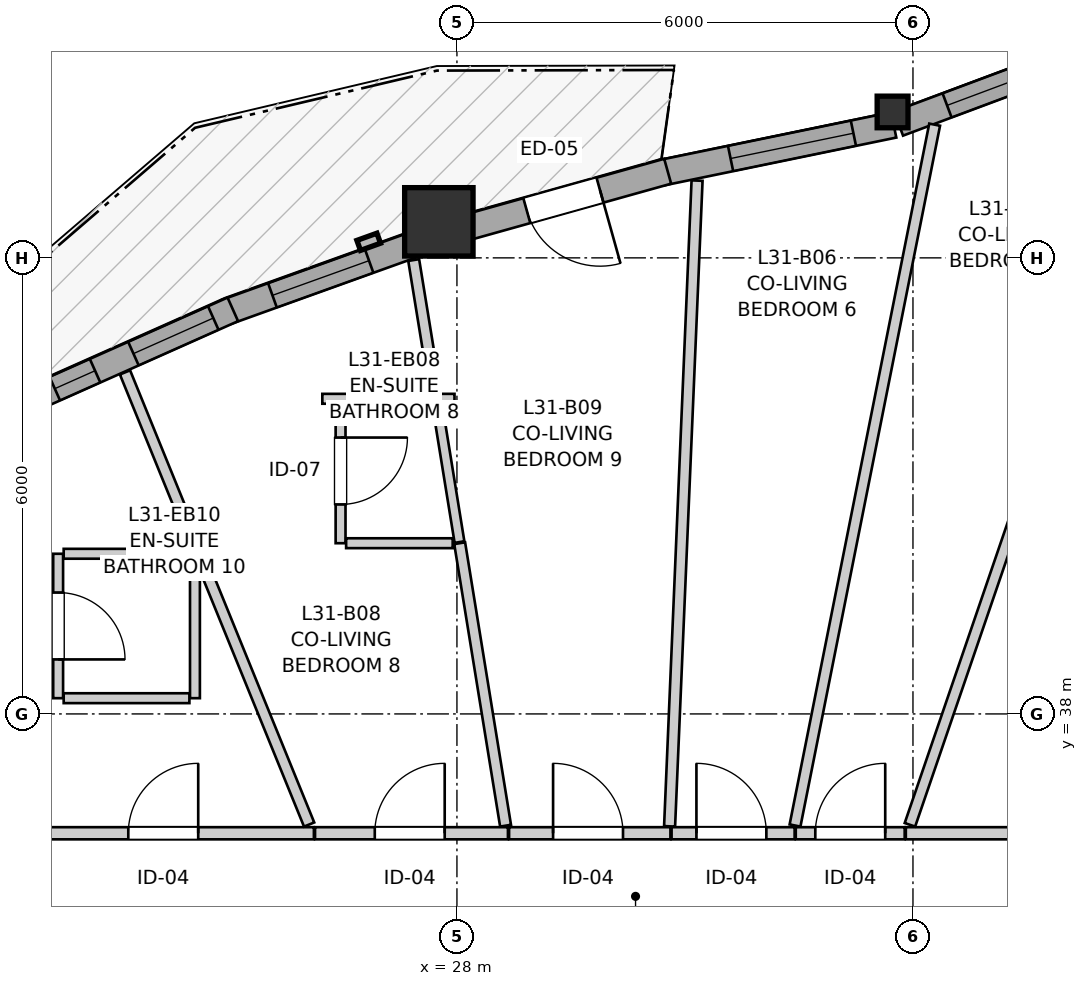
"""IFC4 building model, lengths in metres.
Left out: names, types, materials, properties, quantities, classifications, styles, units other than length and angle.
Written with IfcOpenShell. Run it as: python <this file> out.ifc"""

import sys

from ifc_helpers import new_model, si_unit, direction, frame, frame_2d, origin, origin_2d, place, context, subcontext, project, spatial, rectangle, i_section, extrude, source, transform, mapped, element, fill, save


model = new_model("IFC4")
c1 = context("Model", 3, precision=1e-05, world=origin(), true_north=direction((0.0, 1.0)))
c2 = subcontext(c1, "Body", "Model", "MODEL_VIEW")
j1 = project(units=[si_unit("LENGTHUNIT", "METRE"), si_unit("PLANEANGLEUNIT", "RADIAN")], contexts=[c1])
p1 = place(None, origin())
s1 = spatial("IfcSite", under=j1, at=p1, CompositionType="ELEMENT")
p2 = place(p1, origin())
s2 = spatial("IfcBuilding", under=s1, at=p2, CompositionType="ELEMENT")
p3 = place(p2, frame((0.0, 0.0, 105.6)))
s3 = spatial("IfcBuildingStorey", under=s2, at=p3, CompositionType="ELEMENT", Elevation=105.6)
m1 = source(origin(), c2, "Body", "SweptSolid", [
    extrude(i_section(OverallWidth=0.406, OverallDepth=0.416, WebThickness=0.027, FlangeThickness=0.044, FilletRadius=0.015, at=origin_2d()), origin(), (0.0, 0.0, 1.0), 2.935),
])
p4 = place(p3, frame((33.732, 45.92, 0.0), z_axis=(0.0, 0.0, 1.0), x_axis=(1.0, 0.0, 0.0)))
e1 = element("IfcColumn", 1, at=p4, inside=s3, PredefinedType="PILASTER", context=c2, shape_type="MappedRepresentation", body=[
    mapped(m1, transform((0.0, 0.0, 0.0), x_axis=(1.0, 0.0, 0.0), y_axis=(0.0, 1.0, 0.0), z_axis=(0.0, 0.0, 1.0), scale=1.0)),
])
m2 = source(origin(), c2, "Body", "SweptSolid", [
    extrude(rectangle(XDim=0.9, YDim=0.9, at=origin_2d()), origin(), (0.0, 0.0, 1.0), 2.935),
])
p5 = place(p3, frame((27.762, 44.474, 0.0), z_axis=(0.0, 0.0, 1.0), x_axis=(1.0, 0.0, 0.0)))
e2 = element("IfcColumn", 2, at=p5, inside=s3, PredefinedType="COLUMN", context=c2, shape_type="MappedRepresentation", body=[
    mapped(m2, transform((0.0, 0.0, 0.0), x_axis=(1.0, 0.0, 0.0), y_axis=(0.0, 1.0, 0.0), z_axis=(0.0, 0.0, 1.0), scale=1.0)),
])
p6 = place(p3, frame((35.722, 46.481, 0.0), z_axis=(0.0, 0.0, 1.0), x_axis=(-0.9368002254, -0.349864741994, 0.0)))
e3 = element("IfcWall", 3, at=p6, inside=s3, PredefinedType="SOLIDWALL", context=c2, shape_type="SweptSolid", body=[
    extrude(rectangle(XDim=2.041, YDim=0.34, at=frame_2d((1.021, 0.0))), origin(), (0.0, 0.0, 1.0), 2.465),
])
p7 = place(p6, frame((0.309, 0.0, 0.82)))
e4 = element("IfcOpeningElement", 4, at=p7, cuts=e3, PredefinedType="OPENING", context=c2, shape_type="SweptSolid", body=[
    extrude(rectangle(XDim=1.05, YDim=1.45, at=frame_2d((0.525, 0.725))), frame((0.0, 0.18, 0.0), z_axis=(0.0, -1.0, 0.0), x_axis=(1.0, 0.0, 0.0)), (0.0, 0.0, 1.0), 0.36),
])
p8 = place(p3, frame((33.747, 45.749, 0.0), z_axis=(0.0, 0.0, 1.0), x_axis=(-0.979440240026, -0.201734519153, 0.0)))
e5 = element("IfcWall", 5, at=p8, inside=s3, PredefinedType="SOLIDWALL", context=c2, shape_type="SweptSolid", body=[
    extrude(rectangle(XDim=3.124, YDim=0.34, at=frame_2d((1.562, 0.0))), origin(), (0.0, 0.0, 1.0), 2.465),
])
p9 = place(p8, frame((0.541, 0.0, 0.82)))
e6 = element("IfcOpeningElement", 6, at=p9, cuts=e5, PredefinedType="OPENING", context=c2, shape_type="SweptSolid", body=[
    extrude(rectangle(XDim=1.65, YDim=1.45, at=frame_2d((0.825, 0.725))), frame((0.0, 0.18, 0.0), z_axis=(0.0, -1.0, 0.0), x_axis=(1.0, 0.0, 0.0)), (0.0, 0.0, 1.0), 0.36),
])
p10 = place(p3, frame((30.773, 45.139, 0.0), z_axis=(0.0, 0.0, 1.0), x_axis=(-0.963038749839, -0.269362889627, 0.0)))
e7 = element("IfcWall", 7, at=p10, inside=s3, PredefinedType="SOLIDWALL", context=c2, shape_type="SweptSolid", body=[
    extrude(rectangle(XDim=2.849, YDim=0.34, at=frame_2d((1.424, 0.0))), origin(), (0.0, 0.0, 1.0), 2.465),
])
p11 = place(p10, frame((0.924, 0.0, 0.0)))
e8 = element("IfcOpeningElement", 8, at=p11, cuts=e7, PredefinedType="OPENING", context=c2, shape_type="SweptSolid", body=[
    extrude(rectangle(XDim=1.0, YDim=2.1, at=frame_2d((0.5, 1.05))), frame((0.0, 0.18, 0.0), z_axis=(0.0, -1.0, 0.0), x_axis=(1.0, 0.0, 0.0)), (0.0, 0.0, 1.0), 0.36),
])
p12 = place(p3, frame((27.603, 44.236, 0.0), z_axis=(0.0, 0.0, 1.0), x_axis=(-0.941110715193, -0.33809853852, 0.0)))
e9 = element("IfcWall", 9, at=p12, inside=s3, PredefinedType="SOLIDWALL", context=c2, shape_type="SweptSolid", body=[
    extrude(rectangle(XDim=2.799, YDim=0.34, at=frame_2d((1.399, 0.0))), origin(), (0.0, 0.0, 1.0), 2.465),
])
p13 = place(p12, frame((0.807, 0.0, 0.82)))
e10 = element("IfcOpeningElement", 10, at=p13, cuts=e9, PredefinedType="OPENING", context=c2, shape_type="SweptSolid", body=[
    extrude(rectangle(XDim=1.35, YDim=1.45, at=frame_2d((0.675, 0.725))), frame((0.0, 0.18, 0.0), z_axis=(0.0, -1.0, 0.0), x_axis=(1.0, 0.0, 0.0)), (0.0, 0.0, 1.0), 0.36),
])
p14 = place(p3, frame((25.051, 43.323, 0.0), z_axis=(0.0, 0.0, 1.0), x_axis=(-0.913432176814, -0.406990980686, 0.0)))
e11 = element("IfcWall", 11, at=p14, inside=s3, PredefinedType="SOLIDWALL", context=c2, shape_type="SweptSolid", body=[
    extrude(rectangle(XDim=2.975, YDim=0.34, at=frame_2d((1.488, 0.0))), origin(), (0.0, 0.0, 1.0), 2.465),
])
p15 = place(p14, frame((0.281, 0.0, 0.82)))
e12 = element("IfcOpeningElement", 12, at=p15, cuts=e11, PredefinedType="OPENING", context=c2, shape_type="SweptSolid", body=[
    extrude(rectangle(XDim=1.15, YDim=1.2, at=frame_2d((0.575, 0.6))), frame((0.0, 0.18, 0.0), z_axis=(0.0, -1.0, 0.0), x_axis=(1.0, 0.0, 0.0)), (0.0, 0.0, 1.0), 0.36),
])
p16 = place(p14, frame((1.984, 0.0, 0.82)))
e13 = element("IfcOpeningElement", 13, at=p16, cuts=e11, PredefinedType="OPENING", context=c2, shape_type="SweptSolid", body=[
    extrude(rectangle(XDim=0.58, YDim=1.35, at=frame_2d((0.29, 0.675))), frame((0.0, 0.18, 0.0), z_axis=(0.0, -1.0, 0.0), x_axis=(1.0, 0.0, 0.0)), (0.0, 0.0, 1.0), 0.36),
])
p17 = place(p3, frame((33.906, 36.43, 0.0), z_axis=(0.0, 0.0, 1.0), x_axis=(1.0, 0.0, 0.0)))
e14 = element("IfcWall", 14, at=p17, inside=s3, PredefinedType="PARTITIONING", context=c2, shape_type="SweptSolid", body=[
    extrude(rectangle(XDim=4.624, YDim=0.16, at=frame_2d((2.312, 0.0))), origin(), (0.0, 0.0, 1.0), 2.573),
])
p18 = place(p17, frame((1.84, 0.0, 0.0)))
e15 = element("IfcOpeningElement", 15, at=p18, cuts=e14, PredefinedType="OPENING", context=c2, shape_type="SweptSolid", body=[
    extrude(rectangle(XDim=0.96, YDim=2.1, at=frame_2d((0.48, 1.05))), frame((0.0, 0.09, 0.0), z_axis=(0.0, -1.0, 0.0), x_axis=(1.0, 0.0, 0.0)), (0.0, 0.0, 1.0), 0.18),
])
p19 = place(p3, frame((22.17, 36.43, 0.0), z_axis=(0.0, 0.0, 1.0), x_axis=(1.0, 0.0, 0.0)))
e16 = element("IfcWall", 16, at=p19, inside=s3, PredefinedType="PARTITIONING", context=c2, shape_type="SweptSolid", body=[
    extrude(rectangle(XDim=3.948, YDim=0.16, at=frame_2d((1.974, 0.0))), origin(), (0.0, 0.0, 1.0), 2.573),
])
p20 = place(p19, frame((1.506, 0.0, 0.0)))
e17 = element("IfcOpeningElement", 17, at=p20, cuts=e16, PredefinedType="OPENING", context=c2, shape_type="SweptSolid", body=[
    extrude(rectangle(XDim=0.92, YDim=2.1, at=frame_2d((0.46, 1.05))), frame((0.0, 0.09, 0.0), z_axis=(0.0, -1.0, 0.0), x_axis=(1.0, 0.0, 0.0)), (0.0, 0.0, 1.0), 0.18),
])
p21 = place(p3, frame((26.133, 36.43, 0.0), z_axis=(0.0, 0.0, 1.0), x_axis=(1.0, 0.0, 0.0)))
e18 = element("IfcWall", 18, at=p21, inside=s3, PredefinedType="PARTITIONING", context=c2, shape_type="SweptSolid", body=[
    extrude(rectangle(XDim=2.538, YDim=0.16, at=frame_2d((1.269, 0.0))), origin(), (0.0, 0.0, 1.0), 2.935),
])
p22 = place(p21, frame((0.786, 0.0, 0.0)))
e19 = element("IfcOpeningElement", 19, at=p22, cuts=e18, PredefinedType="OPENING", context=c2, shape_type="SweptSolid", body=[
    extrude(rectangle(XDim=0.92, YDim=2.1, at=frame_2d((0.46, 1.05))), frame((0.0, 0.09, 0.0), z_axis=(0.0, -1.0, 0.0), x_axis=(1.0, 0.0, 0.0)), (0.0, 0.0, 1.0), 0.18),
])
p23 = place(p3, frame((28.686, 36.43, 0.0), z_axis=(0.0, 0.0, 1.0), x_axis=(1.0, 0.0, 0.0)))
e20 = element("IfcWall", 20, at=p23, inside=s3, PredefinedType="PARTITIONING", context=c2, shape_type="SweptSolid", body=[
    extrude(rectangle(XDim=2.123, YDim=0.16, at=frame_2d((1.062, 0.0))), origin(), (0.0, 0.0, 1.0), 2.935),
])
p24 = place(p23, frame((0.579, 0.0, 0.0)))
e21 = element("IfcOpeningElement", 21, at=p24, cuts=e20, PredefinedType="OPENING", context=c2, shape_type="SweptSolid", body=[
    extrude(rectangle(XDim=0.92, YDim=2.1, at=frame_2d((0.46, 1.05))), frame((0.0, 0.09, 0.0), z_axis=(0.0, -1.0, 0.0), x_axis=(1.0, 0.0, 0.0)), (0.0, 0.0, 1.0), 0.18),
])
p25 = place(p3, frame((26.469, 42.073, 0.0), z_axis=(0.0, 0.0, 1.0), x_axis=(0.0, -1.0, 0.0)))
e22 = element("IfcWall", 22, at=p25, inside=s3, PredefinedType="PARTITIONING", context=c2, shape_type="SweptSolid", body=[
    extrude(rectangle(XDim=1.827, YDim=0.13, at=frame_2d((0.914, 0.0))), origin(), (0.0, 0.0, 1.0), 2.935),
])
p26 = place(p25, frame((0.437, 0.0, 0.0)))
e23 = element("IfcOpeningElement", 23, at=p26, cuts=e22, PredefinedType="OPENING", context=c2, shape_type="SweptSolid", body=[
    extrude(rectangle(XDim=0.88, YDim=2.05, at=frame_2d((0.44, 1.025))), frame((0.0, 0.075, 0.0), z_axis=(0.0, -1.0, 0.0), x_axis=(1.0, 0.0, 0.0)), (0.0, 0.0, 1.0), 0.15),
])
p27 = place(p3, frame((22.753, 40.107, 0.0), z_axis=(0.0, 0.0, 1.0), x_axis=(0.0, -1.0, 0.0)))
e24 = element("IfcWall", 24, at=p27, inside=s3, PredefinedType="PARTITIONING", context=c2, shape_type="SweptSolid", body=[
    extrude(rectangle(XDim=1.9, YDim=0.13, at=frame_2d((0.95, 0.0))), origin(), (0.0, 0.0, 1.0), 2.935),
])
p28 = place(p27, frame((0.51, 0.0, 0.0)))
e25 = element("IfcOpeningElement", 25, at=p28, cuts=e24, PredefinedType="OPENING", context=c2, shape_type="SweptSolid", body=[
    extrude(rectangle(XDim=0.88, YDim=2.05, at=frame_2d((0.44, 1.025))), frame((0.0, 0.075, 0.0), z_axis=(0.0, -1.0, 0.0), x_axis=(1.0, 0.0, 0.0)), (0.0, 0.0, 1.0), 0.15),
])
p29 = place(p3, frame((30.824, 36.43, 0.0), z_axis=(0.0, 0.0, 1.0), x_axis=(1.0, 0.0, 0.0)))
e26 = element("IfcWall", 26, at=p29, inside=s3, PredefinedType="PARTITIONING", context=c2, shape_type="SweptSolid", body=[
    extrude(rectangle(XDim=1.619, YDim=0.16, at=frame_2d((0.81, 0.0))), origin(), (0.0, 0.0, 1.0), 2.935),
])
p30 = place(p29, frame((0.327, 0.0, 0.0)))
e27 = element("IfcOpeningElement", 27, at=p30, cuts=e26, PredefinedType="OPENING", context=c2, shape_type="SweptSolid", body=[
    extrude(rectangle(XDim=0.92, YDim=2.1, at=frame_2d((0.46, 1.05))), frame((0.0, 0.09, 0.0), z_axis=(0.0, -1.0, 0.0), x_axis=(1.0, 0.0, 0.0)), (0.0, 0.0, 1.0), 0.18),
])
p31 = place(p3, frame((32.458, 36.43, 0.0), z_axis=(0.0, 0.0, 1.0), x_axis=(1.0, 0.0, 0.0)))
e28 = element("IfcWall", 28, at=p31, inside=s3, PredefinedType="PARTITIONING", context=c2, shape_type="SweptSolid", body=[
    extrude(rectangle(XDim=1.433, YDim=0.16, at=frame_2d((0.717, 0.0))), origin(), (0.0, 0.0, 1.0), 2.935),
])
p32 = place(p31, frame((0.257, 0.0, 0.0)))
e29 = element("IfcOpeningElement", 29, at=p32, cuts=e28, PredefinedType="OPENING", context=c2, shape_type="SweptSolid", body=[
    extrude(rectangle(XDim=0.92, YDim=2.1, at=frame_2d((0.46, 1.05))), frame((0.0, 0.09, 0.0), z_axis=(0.0, -1.0, 0.0), x_axis=(1.0, 0.0, 0.0)), (0.0, 0.0, 1.0), 0.18),
])
p33 = place(p3, frame((33.96, 36.541, 0.0), z_axis=(0.0, 0.0, 1.0), x_axis=(0.324058346196, 0.946037096662, 0.0)))
e30 = element("IfcWall", 30, at=p33, inside=s3, PredefinedType="PARTITIONING", context=c2, shape_type="SweptSolid", body=[
    extrude(rectangle(XDim=10.302, YDim=0.145, at=frame_2d((5.151, 0.0))), origin(), (0.0, 0.0, 1.0), 2.935),
])
p34 = place(p3, frame((32.448, 36.532, 0.0), z_axis=(0.0, 0.0, 1.0), x_axis=(0.195406965811, 0.980722242897, 0.0)))
e31 = element("IfcWall", 31, at=p34, inside=s3, PredefinedType="PARTITIONING", context=c2, shape_type="SweptSolid", body=[
    extrude(rectangle(XDim=9.402, YDim=0.145, at=frame_2d((4.701, 0.0))), origin(), (0.0, 0.0, 1.0), 2.935),
])
p35 = place(p3, frame((30.798, 36.521, 0.0), z_axis=(0.0, 0.0, 1.0), x_axis=(0.042521424142, 0.999095555234, 0.0)))
e32 = element("IfcWall", 32, at=p35, inside=s3, PredefinedType="PARTITIONING", context=c2, shape_type="SweptSolid", body=[
    extrude(rectangle(XDim=8.503, YDim=0.145, at=frame_2d((4.252, 0.0))), origin(), (0.0, 0.0, 1.0), 2.935),
])
p36 = place(p3, frame((23.633, 42.493, 0.0), z_axis=(0.0, 0.0, 1.0), x_axis=(0.37719666663, -0.926133184096, 0.0)))
e33 = element("IfcWall", 33, at=p36, inside=s3, PredefinedType="PARTITIONING", context=c2, shape_type="SweptSolid", body=[
    extrude(rectangle(XDim=6.423, YDim=0.145, at=frame_2d((3.211, 0.0))), origin(), (0.0, 0.0, 1.0), 2.935),
])
p37 = place(p3, frame((28.036, 40.246, 0.0), z_axis=(0.0, 0.0, 1.0), x_axis=(0.160412651813, -0.987050039835, 0.0)))
e34 = element("IfcWall", 34, at=p37, inside=s3, PredefinedType="PARTITIONING", context=c2, shape_type="SweptSolid", body=[
    extrude(rectangle(XDim=3.765, YDim=0.145, at=frame_2d((1.883, 0.0))), origin(), (0.0, 0.0, 1.0), 2.353),
])
p38 = place(p3, frame((27.741, 42.063, 0.0), z_axis=(0.0, 0.0, 1.0), x_axis=(0.160081724147, -0.98710376435, 0.0)))
e35 = element("IfcWall", 35, at=p38, inside=s3, PredefinedType="PARTITIONING", context=c2, shape_type="SweptSolid", body=[
    extrude(rectangle(XDim=1.825, YDim=0.13, at=frame_2d((0.913, 0.0))), origin(), (0.0, 0.0, 1.0), 2.353),
])
p39 = place(p3, frame((24.553, 38.207, 0.0), z_axis=(0.0, 0.0, 1.0), x_axis=(0.0, 1.0, 0.0)))
e36 = element("IfcWall", 36, at=p39, inside=s3, PredefinedType="PARTITIONING", context=c2, shape_type="SweptSolid", body=[
    extrude(rectangle(XDim=1.66, YDim=0.13, at=frame_2d((0.83, 0.0))), origin(), (0.0, 0.0, 1.0), 2.935),
])
p40 = place(p3, frame((27.431, 43.971, 0.0), z_axis=(0.0, 0.0, 1.0), x_axis=(0.160707234414, -0.987002119961, 0.0)))
e37 = element("IfcWall", 37, at=p40, inside=s3, PredefinedType="PARTITIONING", context=c2, shape_type="SweptSolid", body=[
    extrude(rectangle(XDim=1.749, YDim=0.145, at=frame_2d((0.874, 0.0))), origin(), (0.0, 0.0, 1.0), 2.935),
])
p41 = place(p3, frame((22.826, 40.107, 0.0), z_axis=(0.0, 0.0, 1.0), x_axis=(1.0, 0.0, 0.0)))
e38 = element("IfcWall", 38, at=p41, inside=s3, PredefinedType="PARTITIONING", context=c2, shape_type="SweptSolid", body=[
    extrude(rectangle(XDim=1.614, YDim=0.13, at=frame_2d((0.807, 0.0))), origin(), (0.0, 0.0, 1.0), 2.935),
])
p42 = place(p3, frame((22.826, 38.207, 0.0), z_axis=(0.0, 0.0, 1.0), x_axis=(1.0, 0.0, 0.0)))
e39 = element("IfcWall", 39, at=p42, inside=s3, PredefinedType="PARTITIONING", context=c2, shape_type="SweptSolid", body=[
    extrude(rectangle(XDim=1.654, YDim=0.13, at=frame_2d((0.827, 0.0))), origin(), (0.0, 0.0, 1.0), 2.935),
])
p43 = place(p3, frame((26.542, 40.246, 0.0), z_axis=(0.0, 0.0, 1.0), x_axis=(1.0, 0.0, 0.0)))
e40 = element("IfcWall", 40, at=p43, inside=s3, PredefinedType="PARTITIONING", context=c2, shape_type="SweptSolid", body=[
    extrude(rectangle(XDim=1.402, YDim=0.13, at=frame_2d((0.701, 0.0))), origin(), (0.0, 0.0, 1.0), 2.935),
])
p44 = place(p3, frame((26.229, 42.146, 0.0), z_axis=(0.0, 0.0, 1.0), x_axis=(1.0, 0.0, 0.0)))
e41 = element("IfcWall", 41, at=p44, inside=s3, PredefinedType="PARTITIONING", context=c2, shape_type="SweptSolid", body=[
    extrude(rectangle(XDim=1.739, YDim=0.13, at=frame_2d((0.87, 0.0))), origin(), (0.0, 0.0, 1.0), 2.935),
])
m3 = source(origin(), c2, "Body", "SweptSolid", [
    extrude(rectangle(XDim=1.05, YDim=1.45, at=frame_2d((0.525, 0.725))), frame((0.0, 0.03, 0.0), z_axis=(0.0, -1.0, 0.0), x_axis=(1.0, 0.0, 0.0)), (0.0, 0.0, 1.0), 0.06),
])
p45 = place(p7, origin())
e42 = element("IfcWindow", 42, at=p45, inside=s3, PartitioningType="SINGLE_PANEL", PredefinedType="WINDOW", context=c2, shape_type="MappedRepresentation", body=[
    mapped(m3, transform((0.0, 0.0, 0.0), x_axis=(1.0, 0.0, 0.0), y_axis=(0.0, 1.0, 0.0), z_axis=(0.0, 0.0, 1.0), scale=1.0)),
])
fill(e4, e42)
m4 = source(origin(), c2, "Body", "SweptSolid", [
    extrude(rectangle(XDim=1.65, YDim=1.45, at=frame_2d((0.825, 0.725))), frame((0.0, 0.03, 0.0), z_axis=(0.0, -1.0, 0.0), x_axis=(1.0, 0.0, 0.0)), (0.0, 0.0, 1.0), 0.06),
])
p46 = place(p9, origin())
e43 = element("IfcWindow", 43, at=p46, inside=s3, PartitioningType="SINGLE_PANEL", PredefinedType="WINDOW", context=c2, shape_type="MappedRepresentation", body=[
    mapped(m4, transform((0.0, 0.0, 0.0), x_axis=(1.0, 0.0, 0.0), y_axis=(0.0, 1.0, 0.0), z_axis=(0.0, 0.0, 1.0), scale=1.0)),
])
fill(e6, e43)
m5 = source(origin(), c2, "Body", "SweptSolid", [
    extrude(rectangle(XDim=1.35, YDim=1.45, at=frame_2d((0.675, 0.725))), frame((0.0, 0.03, 0.0), z_axis=(0.0, -1.0, 0.0), x_axis=(1.0, 0.0, 0.0)), (0.0, 0.0, 1.0), 0.06),
])
p47 = place(p13, origin())
e44 = element("IfcWindow", 44, at=p47, inside=s3, PartitioningType="SINGLE_PANEL", PredefinedType="WINDOW", context=c2, shape_type="MappedRepresentation", body=[
    mapped(m5, transform((0.0, 0.0, 0.0), x_axis=(1.0, 0.0, 0.0), y_axis=(0.0, 1.0, 0.0), z_axis=(0.0, 0.0, 1.0), scale=1.0)),
])
fill(e10, e44)
m6 = source(origin(), c2, "Body", "SweptSolid", [
    extrude(rectangle(XDim=1.15, YDim=1.2, at=frame_2d((0.575, 0.6))), frame((0.0, 0.03, 0.0), z_axis=(0.0, -1.0, 0.0), x_axis=(1.0, 0.0, 0.0)), (0.0, 0.0, 1.0), 0.06),
])
p48 = place(p15, origin())
e45 = element("IfcWindow", 45, at=p48, inside=s3, PartitioningType="SINGLE_PANEL", PredefinedType="WINDOW", context=c2, shape_type="MappedRepresentation", body=[
    mapped(m6, transform((0.0, 0.0, 0.0), x_axis=(1.0, 0.0, 0.0), y_axis=(0.0, 1.0, 0.0), z_axis=(0.0, 0.0, 1.0), scale=1.0)),
])
fill(e12, e45)
m7 = source(origin(), c2, "Body", "SweptSolid", [
    extrude(rectangle(XDim=0.58, YDim=1.35, at=frame_2d((0.29, 0.675))), frame((0.0, 0.03, 0.0), z_axis=(0.0, -1.0, 0.0), x_axis=(1.0, 0.0, 0.0)), (0.0, 0.0, 1.0), 0.06),
])
p49 = place(p16, origin())
e46 = element("IfcWindow", 46, at=p49, inside=s3, PartitioningType="SINGLE_PANEL", PredefinedType="WINDOW", context=c2, shape_type="MappedRepresentation", body=[
    mapped(m7, transform((0.0, 0.0, 0.0), x_axis=(1.0, 0.0, 0.0), y_axis=(0.0, 1.0, 0.0), z_axis=(0.0, 0.0, 1.0), scale=1.0)),
])
fill(e13, e46)
m8 = source(origin(), c2, "Body", "SweptSolid", [
    extrude(rectangle(XDim=1.0, YDim=2.1, at=frame_2d((0.5, 1.05))), frame((0.0, 0.025, 0.0), z_axis=(0.0, -1.0, 0.0), x_axis=(1.0, 0.0, 0.0)), (0.0, 0.0, 1.0), 0.05),
])
p50 = place(p11, origin())
e47 = element("IfcDoor", 47, at=p50, inside=s3, OperationType="SINGLE_SWING_LEFT", PredefinedType="DOOR", context=c2, shape_type="MappedRepresentation", body=[
    mapped(m8, transform((0.0, 0.0, 0.0), x_axis=(1.0, 0.0, 0.0), y_axis=(0.0, 1.0, 0.0), z_axis=(0.0, 0.0, 1.0), scale=1.0)),
])
fill(e8, e47)
m9 = source(origin(), c2, "Body", "SweptSolid", [
    extrude(rectangle(XDim=0.92, YDim=2.1, at=frame_2d((0.46, 1.05))), frame((0.0, 0.025, 0.0), z_axis=(0.0, -1.0, 0.0), x_axis=(1.0, 0.0, 0.0)), (0.0, 0.0, 1.0), 0.05),
])
p51 = place(p20, origin())
e48 = element("IfcDoor", 48, at=p51, inside=s3, OperationType="SINGLE_SWING_RIGHT", PredefinedType="DOOR", context=c2, shape_type="MappedRepresentation", body=[
    mapped(m9, transform((0.0, 0.0, 0.0), x_axis=(1.0, 0.0, 0.0), y_axis=(0.0, 1.0, 0.0), z_axis=(0.0, 0.0, 1.0), scale=1.0)),
])
fill(e17, e48)
p52 = place(p22, origin())
e49 = element("IfcDoor", 49, at=p52, inside=s3, OperationType="SINGLE_SWING_RIGHT", PredefinedType="DOOR", context=c2, shape_type="MappedRepresentation", body=[
    mapped(m9, transform((0.0, 0.0, 0.0), x_axis=(1.0, 0.0, 0.0), y_axis=(0.0, 1.0, 0.0), z_axis=(0.0, 0.0, 1.0), scale=1.0)),
])
fill(e19, e49)
p53 = place(p24, origin())
e50 = element("IfcDoor", 50, at=p53, inside=s3, OperationType="SINGLE_SWING_LEFT", PredefinedType="DOOR", context=c2, shape_type="MappedRepresentation", body=[
    mapped(m9, transform((0.0, 0.0, 0.0), x_axis=(1.0, 0.0, 0.0), y_axis=(0.0, 1.0, 0.0), z_axis=(0.0, 0.0, 1.0), scale=1.0)),
])
fill(e21, e50)
m10 = source(origin(), c2, "Body", "SweptSolid", [
    extrude(rectangle(XDim=0.88, YDim=2.05, at=frame_2d((0.44, 1.025))), frame((0.0, 0.025, 0.0), z_axis=(0.0, -1.0, 0.0), x_axis=(1.0, 0.0, 0.0)), (0.0, 0.0, 1.0), 0.05),
])
p54 = place(p26, origin())
e51 = element("IfcDoor", 51, at=p54, inside=s3, OperationType="SINGLE_SWING_LEFT", PredefinedType="DOOR", context=c2, shape_type="MappedRepresentation", body=[
    mapped(m10, transform((0.0, 0.0, 0.0), x_axis=(1.0, 0.0, 0.0), y_axis=(0.0, 1.0, 0.0), z_axis=(0.0, 0.0, 1.0), scale=1.0)),
])
fill(e23, e51)
p55 = place(p28, origin())
e52 = element("IfcDoor", 52, at=p55, inside=s3, OperationType="SINGLE_SWING_RIGHT", PredefinedType="DOOR", context=c2, shape_type="MappedRepresentation", body=[
    mapped(m10, transform((0.0, 0.0, 0.0), x_axis=(1.0, 0.0, 0.0), y_axis=(0.0, 1.0, 0.0), z_axis=(0.0, 0.0, 1.0), scale=1.0)),
])
fill(e25, e52)
p56 = place(p30, origin())
e53 = element("IfcDoor", 53, at=p56, inside=s3, OperationType="SINGLE_SWING_LEFT", PredefinedType="DOOR", context=c2, shape_type="MappedRepresentation", body=[
    mapped(m9, transform((0.0, 0.0, 0.0), x_axis=(1.0, 0.0, 0.0), y_axis=(0.0, 1.0, 0.0), z_axis=(0.0, 0.0, 1.0), scale=1.0)),
])
fill(e27, e53)
p57 = place(p32, origin())
e54 = element("IfcDoor", 54, at=p57, inside=s3, OperationType="SINGLE_SWING_RIGHT", PredefinedType="DOOR", context=c2, shape_type="MappedRepresentation", body=[
    mapped(m9, transform((0.0, 0.0, 0.0), x_axis=(1.0, 0.0, 0.0), y_axis=(0.0, 1.0, 0.0), z_axis=(0.0, 0.0, 1.0), scale=1.0)),
])
fill(e29, e54)
save(model, sys.argv[1])
